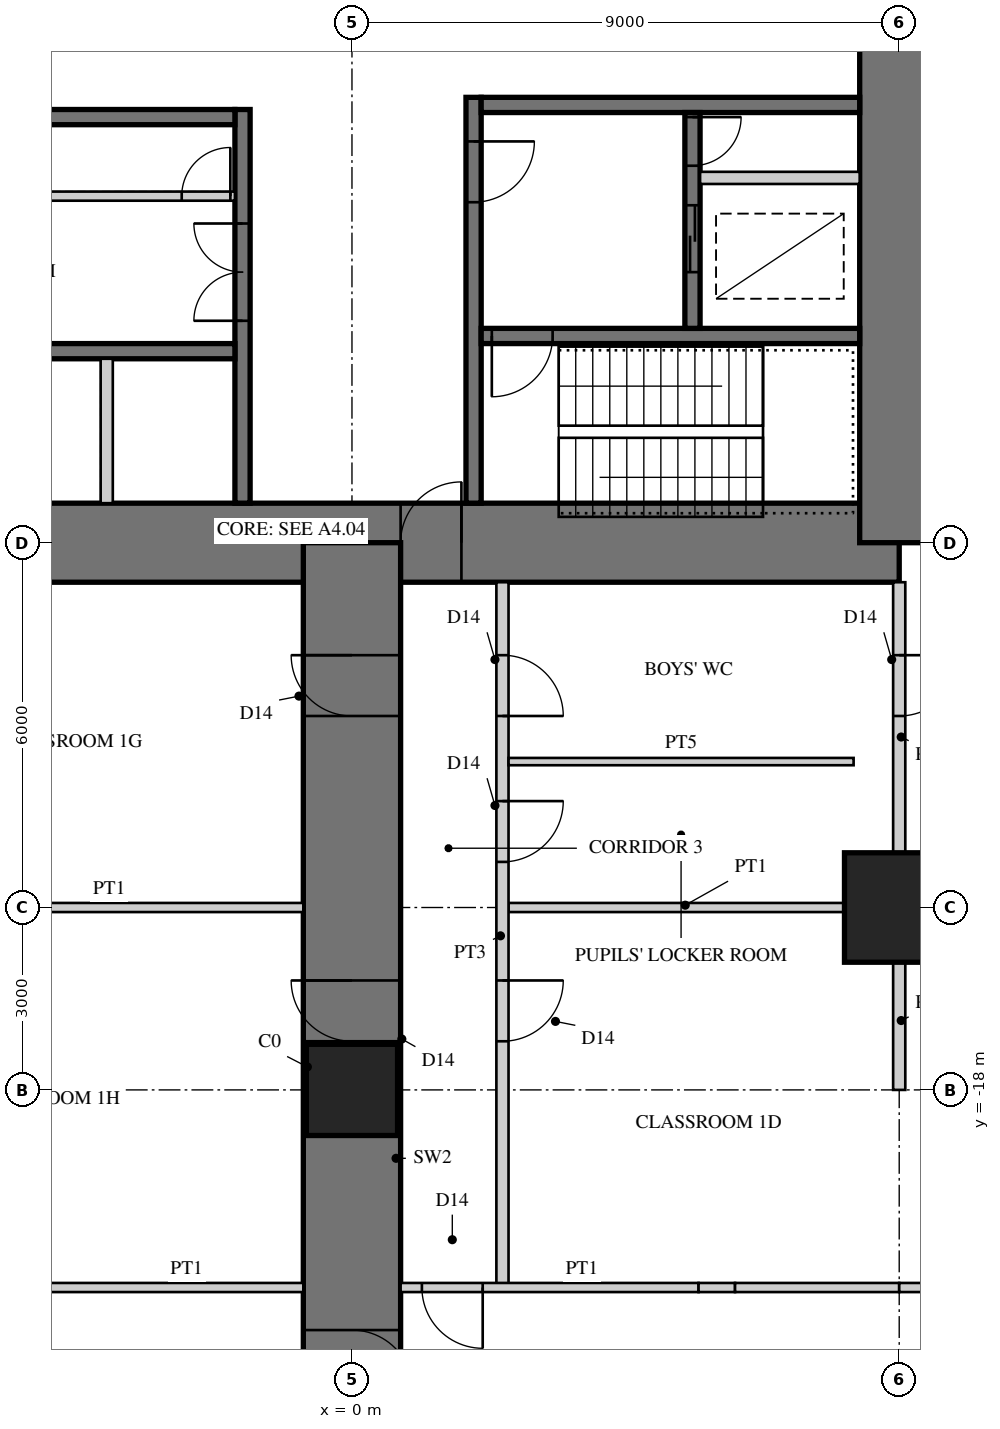
"""IFC4 building model, lengths in metres.
Left out: names, types, materials, properties, quantities, classifications, styles, units other than length and angle.
Written with IfcOpenShell. Run it as: python <this file> out.ifc"""

import sys

from ifc_helpers import new_model, si_unit, direction, frame, frame_2d, origin, origin_2d, place, context, subcontext, project, spatial, rectangle, extrude, element, fill, save


model = new_model("IFC4")
c1 = context("Model", 3, precision=1e-05, world=origin(), true_north=direction((0.0, 1.0)))
c2 = subcontext(c1, "Body", "Model", "MODEL_VIEW")
j1 = project(units=[si_unit("LENGTHUNIT", "METRE"), si_unit("PLANEANGLEUNIT", "RADIAN")], contexts=[c1])
p1 = place(None, origin())
s1 = spatial("IfcSite", under=j1, at=p1, CompositionType="ELEMENT")
p2 = place(p1, origin())
s2 = spatial("IfcBuilding", under=s1, at=p2, CompositionType="ELEMENT")
p3 = place(p2, frame((0.0, 0.0, 5.0)))
s3 = spatial("IfcBuildingStorey", under=s2, at=p3, CompositionType="ELEMENT", Elevation=5.0)
p4 = place(p3, frame((-9.0, -9.0, 0.0), z_axis=(0.0, 0.0, 1.0), x_axis=(1.0, 0.0, 0.0)))
e1 = element("IfcWall", 1, at=p4, inside=s3, PredefinedType="SHEAR", context=c2, shape_type="SweptSolid", body=[
    extrude(rectangle(XDim=18.0, YDim=1.3, at=frame_2d((9.0, 0.0))), origin(), (0.0, 0.0, 1.0), 4.5),
])
p5 = place(p4, frame((9.8, 0.0, 0.0)))
e2 = element("IfcOpeningElement", 2, at=p5, cuts=e1, PredefinedType="OPENING", context=c2, shape_type="SweptSolid", body=[
    extrude(rectangle(XDim=1.0, YDim=2.4, at=frame_2d((0.5, 1.2))), frame((0.0, 0.66, 0.0), z_axis=(0.0, -1.0, 0.0), x_axis=(1.0, 0.0, 0.0)), (0.0, 0.0, 1.0), 1.32),
])
p6 = place(p3, frame((9.0, -9.0, 0.0), z_axis=(0.0, 0.0, 1.0), x_axis=(0.0, 1.0, 0.0)))
e3 = element("IfcWall", 3, at=p6, inside=s3, PredefinedType="SHEAR", context=c2, shape_type="SweptSolid", body=[
    extrude(rectangle(XDim=18.0, YDim=1.3, at=frame_2d((9.0, 0.0))), origin(), (0.0, 0.0, 1.0), 4.5),
])
p7 = place(p6, frame((9.8, 0.0, 0.0)))
e4 = element("IfcOpeningElement", 4, at=p7, cuts=e3, PredefinedType="OPENING", context=c2, shape_type="SweptSolid", body=[
    extrude(rectangle(XDim=1.0, YDim=2.4, at=frame_2d((0.5, 1.2))), frame((0.0, 0.66, 0.0), z_axis=(0.0, -1.0, 0.0), x_axis=(1.0, 0.0, 0.0)), (0.0, 0.0, 1.0), 1.32),
])
p8 = place(p3, frame((-1.8, -1.875, 0.0), z_axis=(0.0, 0.0, 1.0), x_axis=(0.0, -1.0, 0.0)))
e5 = element("IfcWall", 5, at=p8, inside=s3, PredefinedType="SHEAR", context=c2, shape_type="SweptSolid", body=[
    extrude(rectangle(XDim=6.475, YDim=0.25, at=frame_2d((3.238, 0.0))), origin(), (0.0, 0.0, 1.0), 4.5),
])
p9 = place(p8, frame((1.875, 0.0, 0.0)))
e6 = element("IfcOpeningElement", 6, at=p9, cuts=e5, PredefinedType="OPENING", context=c2, shape_type="SweptSolid", body=[
    extrude(rectangle(XDim=1.6, YDim=2.4, at=frame_2d((0.8, 1.2))), frame((0.0, 0.135, 0.0), z_axis=(0.0, -1.0, 0.0), x_axis=(1.0, 0.0, 0.0)), (0.0, 0.0, 1.0), 0.27),
])
for number, where, z_axis, x_axis in (
    (7, (-1.925, -2.0, 0.0), (0.0, 0.0, 1.0), (-1.0, 0.0, 0.0)),
    (8, (-1.925, -5.85, 0.0), (0.0, 0.0, 1.0), (-1.0, 0.0, 0.0)),
):
    element("IfcWall", number, at=place(p3, frame(where, z_axis=z_axis, x_axis=x_axis)), inside=s3, PredefinedType="SHEAR", context=c2, shape_type="SweptSolid", body=[
        extrude(rectangle(XDim=6.425, YDim=0.25, at=frame_2d((3.212, 0.0))), origin(), (0.0, 0.0, 1.0), 4.5),
    ])
p10 = place(p3, frame((-1.925, -3.3, 0.0), z_axis=(0.0, 0.0, 1.0), x_axis=(-1.0, 0.0, 0.0)))
e9 = element("IfcWall", 9, at=p10, inside=s3, PredefinedType="PARTITIONING", context=c2, shape_type="SweptSolid", body=[
    extrude(rectangle(XDim=6.425, YDim=0.15, at=frame_2d((3.212, 0.0))), origin(), (0.0, 0.0, 1.0), 4.5),
])
p11 = place(p10, frame((0.075, 0.0, 0.0)))
e10 = element("IfcOpeningElement", 10, at=p11, cuts=e9, PredefinedType="OPENING", context=c2, shape_type="SweptSolid", body=[
    extrude(rectangle(XDim=0.8, YDim=2.1, at=frame_2d((0.4, 1.05))), frame((0.0, 0.085, 0.0), z_axis=(0.0, -1.0, 0.0), x_axis=(1.0, 0.0, 0.0)), (0.0, 0.0, 1.0), 0.17),
])
p12 = place(p10, frame((3.675, 0.0, 0.0)))
e11 = element("IfcOpeningElement", 11, at=p12, cuts=e9, PredefinedType="OPENING", context=c2, shape_type="SweptSolid", body=[
    extrude(rectangle(XDim=0.8, YDim=2.1, at=frame_2d((0.4, 1.05))), frame((0.0, 0.085, 0.0), z_axis=(0.0, -1.0, 0.0), x_axis=(1.0, 0.0, 0.0)), (0.0, 0.0, 1.0), 0.17),
])
p13 = place(p3, frame((-4.033, -5.975, 0.0), z_axis=(0.0, 0.0, 1.0), x_axis=(0.0, -1.0, 0.0)))
e12 = element("IfcWall", 12, at=p13, inside=s3, PredefinedType="PARTITIONING", context=c2, shape_type="SweptSolid", body=[
    extrude(rectangle(XDim=2.375, YDim=0.2, at=frame_2d((1.188, 0.0))), origin(), (0.0, 0.0, 1.0), 4.5),
])
p14 = place(p3, frame((2.0, -1.675, 0.0), z_axis=(0.0, 0.0, 1.0), x_axis=(0.0, -1.0, 0.0)))
e13 = element("IfcWall", 13, at=p14, inside=s3, PredefinedType="SHEAR", context=c2, shape_type="SweptSolid", body=[
    extrude(rectangle(XDim=6.675, YDim=0.25, at=frame_2d((3.337, 0.0))), origin(), (0.0, 0.0, 1.0), 4.5),
])
p15 = place(p14, frame((0.725, 0.0, 0.0)))
e14 = element("IfcOpeningElement", 14, at=p15, cuts=e13, PredefinedType="OPENING", context=c2, shape_type="SweptSolid", body=[
    extrude(rectangle(XDim=1.0, YDim=2.1, at=frame_2d((0.5, 1.05))), frame((0.0, 0.135, 0.0), z_axis=(0.0, -1.0, 0.0), x_axis=(1.0, 0.0, 0.0)), (0.0, 0.0, 1.0), 0.27),
])
p16 = place(p3, frame((2.125, -1.8, 0.0), z_axis=(0.0, 0.0, 1.0), x_axis=(1.0, 0.0, 0.0)))
e15 = element("IfcWall", 15, at=p16, inside=s3, PredefinedType="SHEAR", context=c2, shape_type="SweptSolid", body=[
    extrude(rectangle(XDim=6.225, YDim=0.25, at=frame_2d((3.113, 0.0))), origin(), (0.0, 0.0, 1.0), 4.5),
])
p17 = place(p3, frame((2.125, -5.6, 0.0), z_axis=(0.0, 0.0, 1.0), x_axis=(1.0, 0.0, 0.0)))
e16 = element("IfcWall", 16, at=p17, inside=s3, PredefinedType="SHEAR", context=c2, shape_type="SweptSolid", body=[
    extrude(rectangle(XDim=6.225, YDim=0.25, at=frame_2d((3.113, 0.0))), origin(), (0.0, 0.0, 1.0), 4.5),
])
p18 = place(p17, frame((0.175, 0.0, 0.0)))
e17 = element("IfcOpeningElement", 17, at=p18, cuts=e16, PredefinedType="OPENING", context=c2, shape_type="SweptSolid", body=[
    extrude(rectangle(XDim=1.0, YDim=2.1, at=frame_2d((0.5, 1.05))), frame((0.0, 0.135, 0.0), z_axis=(0.0, -1.0, 0.0), x_axis=(1.0, 0.0, 0.0)), (0.0, 0.0, 1.0), 0.27),
])
p19 = place(p3, frame((5.6, -1.925, 0.0), z_axis=(0.0, 0.0, 1.0), x_axis=(0.0, -1.0, 0.0)))
e18 = element("IfcWall", 18, at=p19, inside=s3, PredefinedType="SHEAR", context=c2, shape_type="SweptSolid", body=[
    extrude(rectangle(XDim=3.55, YDim=0.25, at=frame_2d((1.775, 0.0))), origin(), (0.0, 0.0, 1.0), 4.5),
])
p20 = place(p19, frame((1.525, 0.0, 0.0)))
e19 = element("IfcOpeningElement", 19, at=p20, cuts=e18, PredefinedType="OPENING", context=c2, shape_type="SweptSolid", body=[
    extrude(rectangle(XDim=1.1, YDim=2.2, at=frame_2d((0.55, 1.1))), frame((0.0, 0.135, 0.0), z_axis=(0.0, -1.0, 0.0), x_axis=(1.0, 0.0, 0.0)), (0.0, 0.0, 1.0), 0.27),
])
p21 = place(p19, frame((0.075, 0.0, 0.0)))
e20 = element("IfcOpeningElement", 20, at=p21, cuts=e18, PredefinedType="OPENING", context=c2, shape_type="SweptSolid", body=[
    extrude(rectangle(XDim=0.8, YDim=2.1, at=frame_2d((0.4, 1.05))), frame((0.0, 0.135, 0.0), z_axis=(0.0, -1.0, 0.0), x_axis=(1.0, 0.0, 0.0)), (0.0, 0.0, 1.0), 0.27),
])
p22 = place(p3, frame((5.725, -3.0, 0.0), z_axis=(0.0, 0.0, 1.0), x_axis=(1.0, 0.0, 0.0)))
e21 = element("IfcWall", 21, at=p22, inside=s3, PredefinedType="PARTITIONING", context=c2, shape_type="SweptSolid", body=[
    extrude(rectangle(XDim=2.625, YDim=0.2, at=frame_2d((1.312, 0.0))), origin(), (0.0, 0.0, 1.0), 4.5),
])
p23 = place(p3, frame((0.0, -9.0, 0.0), z_axis=(0.0, 0.0, 1.0), x_axis=(0.0, -1.0, 0.0)))
e22 = element("IfcWall", 22, at=p23, inside=s3, PredefinedType="SHEAR", context=c2, shape_type="SweptSolid", body=[
    extrude(rectangle(XDim=18.0, YDim=1.6, at=frame_2d((9.0, 0.0))), origin(), (0.0, 0.0, 1.0), 4.5),
])
p24 = place(p23, frame((1.85, 0.0, 0.0)))
e23 = element("IfcOpeningElement", 23, at=p24, cuts=e22, PredefinedType="OPENING", context=c2, shape_type="SweptSolid", body=[
    extrude(rectangle(XDim=1.0, YDim=2.2, at=frame_2d((0.5, 1.1))), frame((0.0, 0.81, 0.0), z_axis=(0.0, -1.0, 0.0), x_axis=(1.0, 0.0, 0.0)), (0.0, 0.0, 1.0), 1.62),
])
p25 = place(p23, frame((7.2, 0.0, 0.0)))
e24 = element("IfcOpeningElement", 24, at=p25, cuts=e22, PredefinedType="OPENING", context=c2, shape_type="SweptSolid", body=[
    extrude(rectangle(XDim=1.0, YDim=2.2, at=frame_2d((0.5, 1.1))), frame((0.0, 0.81, 0.0), z_axis=(0.0, -1.0, 0.0), x_axis=(1.0, 0.0, 0.0)), (0.0, 0.0, 1.0), 1.62),
])
p26 = place(p23, frame((12.95, 0.0, 0.0)))
e25 = element("IfcOpeningElement", 25, at=p26, cuts=e22, PredefinedType="OPENING", context=c2, shape_type="SweptSolid", body=[
    extrude(rectangle(XDim=1.0, YDim=2.2, at=frame_2d((0.5, 1.1))), frame((0.0, 0.81, 0.0), z_axis=(0.0, -1.0, 0.0), x_axis=(1.0, 0.0, 0.0)), (0.0, 0.0, 1.0), 1.62),
])
p27 = place(p3, frame((9.0, -15.0, 0.0), z_axis=(0.0, 0.0, 1.0), x_axis=(1.0, 0.0, 0.0)))
e26 = element("IfcColumn", 26, at=p27, inside=s3, PredefinedType="COLUMN", context=c2, shape_type="SweptSolid", body=[
    extrude(rectangle(XDim=1.8, YDim=1.8, at=origin_2d()), origin(), (0.0, 0.0, 1.0), 4.5),
])
p28 = place(p3, frame((0.0, -18.0, 0.0), z_axis=(0.0, 0.0, 1.0), x_axis=(1.0, 0.0, 0.0)))
e27 = element("IfcColumn", 27, at=p28, inside=s3, PredefinedType="COLUMN", context=c2, shape_type="SweptSolid", body=[
    extrude(rectangle(XDim=1.5, YDim=1.5, at=origin_2d()), origin(), (0.0, 0.0, 1.0), 4.5),
])
p29 = place(p3, frame((2.575, -15.0, 0.0), z_axis=(0.0, 0.0, 1.0), x_axis=(1.0, 0.0, 0.0)))
e28 = element("IfcWall", 28, at=p29, inside=s3, PredefinedType="PARTITIONING", context=c2, shape_type="SweptSolid", body=[
    extrude(rectangle(XDim=5.675, YDim=0.15, at=frame_2d((2.837, 0.0))), origin(), (0.0, 0.0, 1.0), 3.35),
])
p30 = place(p3, frame((-8.25, -15.0, 0.0), z_axis=(0.0, 0.0, 1.0), x_axis=(1.0, 0.0, 0.0)))
e29 = element("IfcWall", 29, at=p30, inside=s3, PredefinedType="PARTITIONING", context=c2, shape_type="SweptSolid", body=[
    extrude(rectangle(XDim=7.45, YDim=0.15, at=frame_2d((3.725, 0.0))), origin(), (0.0, 0.0, 1.0), 3.35),
])
p31 = place(p3, frame((2.475, -9.65, 0.0), z_axis=(0.0, 0.0, 1.0), x_axis=(0.0, -1.0, 0.0)))
e30 = element("IfcWall", 30, at=p31, inside=s3, PredefinedType="SOLIDWALL", context=c2, shape_type="SweptSolid", body=[
    extrude(rectangle(XDim=11.6, YDim=0.2, at=frame_2d((5.8, 0.0))), origin(), (0.0, 0.0, 1.0), 4.3),
])
p32 = place(p31, frame((1.2, 0.0, 0.0)))
e31 = element("IfcOpeningElement", 31, at=p32, cuts=e30, PredefinedType="OPENING", context=c2, shape_type="SweptSolid", body=[
    extrude(rectangle(XDim=1.0, YDim=2.2, at=frame_2d((0.5, 1.1))), frame((0.0, 0.11, 0.0), z_axis=(0.0, -1.0, 0.0), x_axis=(1.0, 0.0, 0.0)), (0.0, 0.0, 1.0), 0.22),
])
p33 = place(p31, frame((3.6, 0.0, 0.0)))
e32 = element("IfcOpeningElement", 32, at=p33, cuts=e30, PredefinedType="OPENING", context=c2, shape_type="SweptSolid", body=[
    extrude(rectangle(XDim=1.0, YDim=2.2, at=frame_2d((0.5, 1.1))), frame((0.0, 0.11, 0.0), z_axis=(0.0, -1.0, 0.0), x_axis=(1.0, 0.0, 0.0)), (0.0, 0.0, 1.0), 0.22),
])
p34 = place(p31, frame((6.55, 0.0, 0.0)))
e33 = element("IfcOpeningElement", 33, at=p34, cuts=e30, PredefinedType="OPENING", context=c2, shape_type="SweptSolid", body=[
    extrude(rectangle(XDim=1.0, YDim=2.2, at=frame_2d((0.5, 1.1))), frame((0.0, 0.11, 0.0), z_axis=(0.0, -1.0, 0.0), x_axis=(1.0, 0.0, 0.0)), (0.0, 0.0, 1.0), 0.22),
])
p35 = place(p3, frame((-5.7, -21.25, 0.0), z_axis=(0.0, 0.0, 1.0), x_axis=(1.0, 0.0, 0.0)))
e34 = element("IfcWall", 34, at=p35, inside=s3, PredefinedType="PARTITIONING", context=c2, shape_type="SweptSolid", body=[
    extrude(rectangle(XDim=4.9, YDim=0.15, at=frame_2d((2.45, 0.0))), origin(), (0.0, 0.0, 1.0), 3.35),
])
p36 = place(p3, frame((0.8, -21.25, 0.0), z_axis=(0.0, 0.0, 1.0), x_axis=(1.0, 0.0, 0.0)))
e35 = element("IfcWall", 35, at=p36, inside=s3, PredefinedType="PARTITIONING", context=c2, shape_type="SweptSolid", body=[
    extrude(rectangle(XDim=4.9, YDim=0.15, at=frame_2d((2.45, 0.0))), origin(), (0.0, 0.0, 1.0), 3.35),
])
p37 = place(p36, frame((0.35, 0.0, 0.0)))
e36 = element("IfcOpeningElement", 36, at=p37, cuts=e35, PredefinedType="OPENING", context=c2, shape_type="SweptSolid", body=[
    extrude(rectangle(XDim=1.0, YDim=2.2, at=frame_2d((0.5, 1.1))), frame((0.0, 0.085, 0.0), z_axis=(0.0, -1.0, 0.0), x_axis=(1.0, 0.0, 0.0)), (0.0, 0.0, 1.0), 0.17),
])
p38 = place(p3, frame((5.7, -21.25, 0.0), z_axis=(0.0, 0.0, 1.0), x_axis=(1.0, 0.0, 0.0)))
e37 = element("IfcWall", 37, at=p38, inside=s3, PredefinedType="PARTITIONING", context=c2, shape_type="SweptSolid", body=[
    extrude(rectangle(XDim=0.6, YDim=0.15, at=frame_2d((0.3, 0.0))), origin(), (0.0, 0.0, 1.0), 4.3),
])
p39 = place(p3, frame((6.3, -21.25, 0.0), z_axis=(0.0, 0.0, 1.0), x_axis=(1.0, 0.0, 0.0)))
e38 = element("IfcWall", 38, at=p39, inside=s3, PredefinedType="PARTITIONING", context=c2, shape_type="SweptSolid", body=[
    extrude(rectangle(XDim=2.7, YDim=0.15, at=frame_2d((1.35, 0.0))), origin(), (0.0, 0.0, 1.0), 3.35),
])
p40 = place(p3, frame((9.0, -21.25, 0.0), z_axis=(0.0, 0.0, 1.0), x_axis=(1.0, 0.0, 0.0)))
e39 = element("IfcWall", 39, at=p40, inside=s3, PredefinedType="PARTITIONING", context=c2, shape_type="SweptSolid", body=[
    extrude(rectangle(XDim=0.72, YDim=0.15, at=frame_2d((0.36, 0.0))), origin(), (0.0, 0.0, 1.0), 4.3),
])
p41 = place(p3, frame((2.575, -12.6, 0.0), z_axis=(0.0, 0.0, 1.0), x_axis=(1.0, 0.0, 0.0)))
e40 = element("IfcWall", 40, at=p41, inside=s3, PredefinedType="PLUMBINGWALL", context=c2, shape_type="SweptSolid", body=[
    extrude(rectangle(XDim=5.675, YDim=0.12, at=frame_2d((2.837, 0.0))), origin(), (0.0, 0.0, 1.0), 4.3),
])
p42 = place(p3, frame((9.0, -9.65, 0.0), z_axis=(0.0, 0.0, 1.0), x_axis=(0.0, -1.0, 0.0)))
e41 = element("IfcWall", 41, at=p42, inside=s3, PredefinedType="SOLIDWALL", context=c2, shape_type="SweptSolid", body=[
    extrude(rectangle(XDim=4.6, YDim=0.2, at=frame_2d((2.3, 0.0))), origin(), (0.0, 0.0, 1.0), 3.3),
])
p43 = place(p42, frame((1.2, 0.0, 0.0)))
e42 = element("IfcOpeningElement", 42, at=p43, cuts=e41, PredefinedType="OPENING", context=c2, shape_type="SweptSolid", body=[
    extrude(rectangle(XDim=1.0, YDim=2.2, at=frame_2d((0.5, 1.1))), frame((0.0, 0.11, 0.0), z_axis=(0.0, -1.0, 0.0), x_axis=(1.0, 0.0, 0.0)), (0.0, 0.0, 1.0), 0.22),
])
p44 = place(p3, frame((9.0, -15.75, 0.0), z_axis=(0.0, 0.0, 1.0), x_axis=(0.0, -1.0, 0.0)))
e43 = element("IfcWall", 43, at=p44, inside=s3, PredefinedType="SOLIDWALL", context=c2, shape_type="SweptSolid", body=[
    extrude(rectangle(XDim=2.25, YDim=0.2, at=frame_2d((1.125, 0.0))), origin(), (0.0, 0.0, 1.0), 3.3),
])
p45 = place(p32, origin())
e44 = element("IfcDoor", 44, at=p45, inside=s3, OperationType="SINGLE_SWING_RIGHT", PredefinedType="DOOR", context=c2, shape_type="SweptSolid", body=[
    extrude(rectangle(XDim=1.0, YDim=2.2, at=frame_2d((0.5, 1.1))), frame((0.0, 0.025, 0.0), z_axis=(0.0, -1.0, 0.0), x_axis=(1.0, 0.0, 0.0)), (0.0, 0.0, 1.0), 0.05),
])
fill(e31, e44)
p46 = place(p33, origin())
e45 = element("IfcDoor", 45, at=p46, inside=s3, OperationType="SINGLE_SWING_LEFT", PredefinedType="DOOR", context=c2, shape_type="SweptSolid", body=[
    extrude(rectangle(XDim=1.0, YDim=2.2, at=frame_2d((0.5, 1.1))), frame((0.0, 0.025, 0.0), z_axis=(0.0, -1.0, 0.0), x_axis=(1.0, 0.0, 0.0)), (0.0, 0.0, 1.0), 0.05),
])
fill(e32, e45)
p47 = place(p34, origin())
e46 = element("IfcDoor", 46, at=p47, inside=s3, OperationType="SINGLE_SWING_LEFT", PredefinedType="DOOR", context=c2, shape_type="SweptSolid", body=[
    extrude(rectangle(XDim=1.0, YDim=2.2, at=frame_2d((0.5, 1.1))), frame((0.0, 0.025, 0.0), z_axis=(0.0, -1.0, 0.0), x_axis=(1.0, 0.0, 0.0)), (0.0, 0.0, 1.0), 0.05),
])
fill(e33, e46)
p48 = place(p37, frame((1.0, 0.0, 0.0), z_axis=(0.0, 0.0, 1.0), x_axis=(-1.0, 0.0, 0.0)))
e47 = element("IfcDoor", 47, at=p48, inside=s3, OperationType="SINGLE_SWING_LEFT", PredefinedType="DOOR", context=c2, shape_type="SweptSolid", body=[
    extrude(rectangle(XDim=1.0, YDim=2.2, at=frame_2d((0.5, 1.1))), frame((0.0, 0.025, 0.0), z_axis=(0.0, -1.0, 0.0), x_axis=(1.0, 0.0, 0.0)), (0.0, 0.0, 1.0), 0.05),
])
fill(e36, e47)
p49 = place(p43, origin())
e48 = element("IfcDoor", 48, at=p49, inside=s3, OperationType="SINGLE_SWING_LEFT", PredefinedType="DOOR", context=c2, shape_type="SweptSolid", body=[
    extrude(rectangle(XDim=1.0, YDim=2.2, at=frame_2d((0.5, 1.1))), frame((0.0, 0.025, 0.0), z_axis=(0.0, -1.0, 0.0), x_axis=(1.0, 0.0, 0.0)), (0.0, 0.0, 1.0), 0.05),
])
fill(e42, e48)
p50 = place(p24, frame((1.0, 0.0, 0.0), z_axis=(0.0, 0.0, 1.0), x_axis=(-1.0, 0.0, 0.0)))
e49 = element("IfcDoor", 49, at=p50, inside=s3, OperationType="SINGLE_SWING_RIGHT", PredefinedType="DOOR", context=c2, shape_type="SweptSolid", body=[
    extrude(rectangle(XDim=1.0, YDim=2.2, at=frame_2d((0.5, 1.1))), frame((0.0, 0.025, 0.0), z_axis=(0.0, -1.0, 0.0), x_axis=(1.0, 0.0, 0.0)), (0.0, 0.0, 1.0), 0.05),
])
fill(e23, e49)
p51 = place(p25, frame((1.0, 0.0, 0.0), z_axis=(0.0, 0.0, 1.0), x_axis=(-1.0, 0.0, 0.0)))
e50 = element("IfcDoor", 50, at=p51, inside=s3, OperationType="SINGLE_SWING_RIGHT", PredefinedType="DOOR", context=c2, shape_type="SweptSolid", body=[
    extrude(rectangle(XDim=1.0, YDim=2.2, at=frame_2d((0.5, 1.1))), frame((0.0, 0.025, 0.0), z_axis=(0.0, -1.0, 0.0), x_axis=(1.0, 0.0, 0.0)), (0.0, 0.0, 1.0), 0.05),
])
fill(e24, e50)
p52 = place(p26, origin())
e51 = element("IfcDoor", 51, at=p52, inside=s3, OperationType="SINGLE_SWING_RIGHT", PredefinedType="DOOR", context=c2, shape_type="SweptSolid", body=[
    extrude(rectangle(XDim=1.0, YDim=2.2, at=frame_2d((0.5, 1.1))), frame((0.0, 0.025, 0.0), z_axis=(0.0, -1.0, 0.0), x_axis=(1.0, 0.0, 0.0)), (0.0, 0.0, 1.0), 0.05),
])
fill(e25, e51)
p53 = place(p5, origin())
e52 = element("IfcDoor", 52, at=p53, inside=s3, OperationType="SINGLE_SWING_RIGHT", PredefinedType="DOOR", context=c2, shape_type="SweptSolid", body=[
    extrude(rectangle(XDim=1.0, YDim=2.4, at=frame_2d((0.5, 1.2))), frame((0.0, 0.055, 0.0), z_axis=(0.0, -1.0, 0.0), x_axis=(1.0, 0.0, 0.0)), (0.0, 0.0, 1.0), 0.05),
])
fill(e2, e52)
p54 = place(p9, frame((1.6, 0.0, 0.0), z_axis=(0.0, 0.0, 1.0), x_axis=(-1.0, 0.0, 0.0)))
e53 = element("IfcDoor", 53, at=p54, inside=s3, OperationType="DOUBLE_DOOR_SINGLE_SWING", PredefinedType="DOOR", context=c2, shape_type="SweptSolid", body=[
    extrude(rectangle(XDim=1.6, YDim=2.4, at=frame_2d((0.8, 1.2))), frame((0.0, 0.025, 0.0), z_axis=(0.0, -1.0, 0.0), x_axis=(1.0, 0.0, 0.0)), (0.0, 0.0, 1.0), 0.05),
])
fill(e6, e53)
p55 = place(p11, frame((0.8, 0.0, 0.0), z_axis=(0.0, 0.0, 1.0), x_axis=(-1.0, 0.0, 0.0)))
e54 = element("IfcDoor", 54, at=p55, inside=s3, OperationType="SINGLE_SWING_RIGHT", PredefinedType="DOOR", context=c2, shape_type="SweptSolid", body=[
    extrude(rectangle(XDim=0.8, YDim=2.1, at=frame_2d((0.4, 1.05))), frame((0.0, 0.025, 0.0), z_axis=(0.0, -1.0, 0.0), x_axis=(1.0, 0.0, 0.0)), (0.0, 0.0, 1.0), 0.05),
])
fill(e10, e54)
p56 = place(p15, origin())
e55 = element("IfcDoor", 55, at=p56, inside=s3, OperationType="SINGLE_SWING_LEFT", PredefinedType="DOOR", context=c2, shape_type="SweptSolid", body=[
    extrude(rectangle(XDim=1.0, YDim=2.1, at=frame_2d((0.5, 1.05))), frame((0.0, 0.025, 0.0), z_axis=(0.0, -1.0, 0.0), x_axis=(1.0, 0.0, 0.0)), (0.0, 0.0, 1.0), 0.05),
])
fill(e14, e55)
p57 = place(p18, frame((1.0, 0.0, 0.0), z_axis=(0.0, 0.0, 1.0), x_axis=(-1.0, 0.0, 0.0)))
e56 = element("IfcDoor", 56, at=p57, inside=s3, OperationType="SINGLE_SWING_RIGHT", PredefinedType="DOOR", context=c2, shape_type="SweptSolid", body=[
    extrude(rectangle(XDim=1.0, YDim=2.1, at=frame_2d((0.5, 1.05))), frame((0.0, 0.025, 0.0), z_axis=(0.0, -1.0, 0.0), x_axis=(1.0, 0.0, 0.0)), (0.0, 0.0, 1.0), 0.05),
])
fill(e17, e56)
p58 = place(p20, origin())
e57 = element("IfcDoor", 57, at=p58, inside=s3, OperationType="DOUBLE_DOOR_SLIDING", PredefinedType="DOOR", context=c2, shape_type="SweptSolid", body=[
    extrude(rectangle(XDim=1.1, YDim=2.2, at=frame_2d((0.55, 1.1))), frame((0.0, 0.025, 0.0), z_axis=(0.0, -1.0, 0.0), x_axis=(1.0, 0.0, 0.0)), (0.0, 0.0, 1.0), 0.05),
])
fill(e19, e57)
p59 = place(p21, origin())
e58 = element("IfcDoor", 58, at=p59, inside=s3, OperationType="SINGLE_SWING_LEFT", PredefinedType="DOOR", context=c2, shape_type="SweptSolid", body=[
    extrude(rectangle(XDim=0.8, YDim=2.1, at=frame_2d((0.4, 1.05))), frame((0.0, 0.025, 0.0), z_axis=(0.0, -1.0, 0.0), x_axis=(1.0, 0.0, 0.0)), (0.0, 0.0, 1.0), 0.05),
])
fill(e20, e58)
save(model, sys.argv[1])
